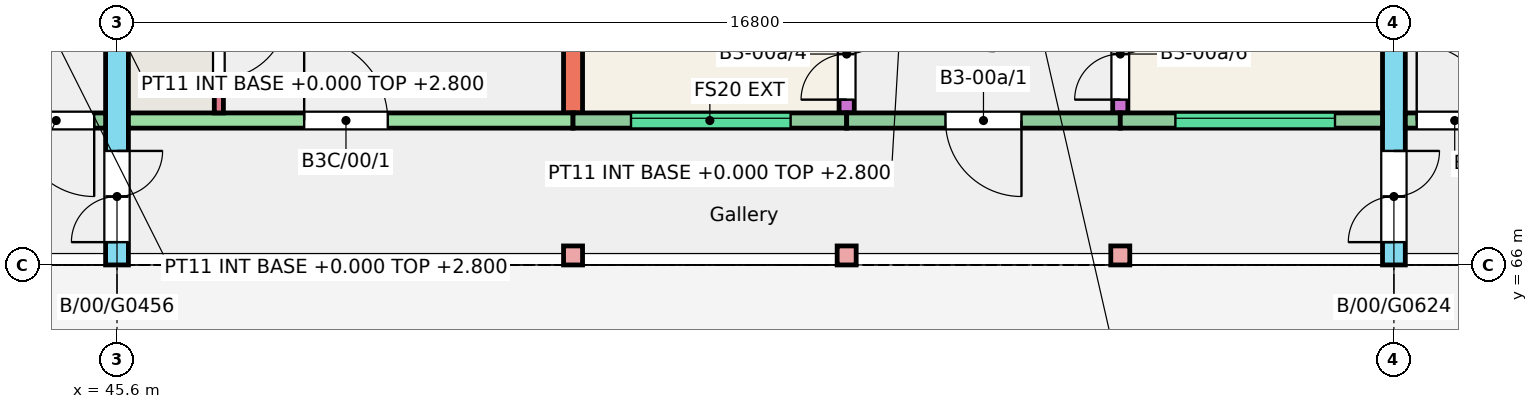
"""IFC4 building model, lengths in metres.
Left out: names, types, materials, properties, quantities, classifications, styles, units other than length and angle.
Written with IfcOpenShell. Run it as: python <this file> out.ifc"""

import sys

from ifc_helpers import new_model, si_unit, direction, frame, frame_2d, origin, origin_2d, place, context, subcontext, project, spatial, rectangle, extrude, element, fill, save


model = new_model("IFC4")
c1 = context("Model", 3, precision=1e-05, world=origin(), true_north=direction((0.0, 1.0)))
c2 = subcontext(c1, "Body", "Model", "MODEL_VIEW")
j1 = project(units=[si_unit("LENGTHUNIT", "METRE"), si_unit("PLANEANGLEUNIT", "RADIAN")], contexts=[c1])
p1 = place(None, origin())
s1 = spatial("IfcSite", under=j1, at=p1, CompositionType="ELEMENT")
p2 = place(p1, origin())
s2 = spatial("IfcBuilding", under=s1, at=p2, CompositionType="ELEMENT")
p3 = place(p2, origin())
s3 = spatial("IfcBuildingStorey", under=s2, at=p3, CompositionType="ELEMENT", Elevation=0.0)
p4 = place(p3, frame((45.6, 66.0, -0.25), z_axis=(0.0, 0.0, 1.0), x_axis=(0.0, 1.0, 0.0)))
e1 = element("IfcWall", 1, at=p4, inside=s3, PredefinedType="SHEAR", context=c2, shape_type="SweptSolid", body=[
    extrude(rectangle(XDim=11.0, YDim=0.3, at=frame_2d((5.5, 0.0))), origin(), (0.0, 0.0, 1.0), 3.25),
])
p5 = place(p4, frame((0.3, 0.0, 0.25)))
e2 = element("IfcOpeningElement", 2, at=p5, cuts=e1, PredefinedType="OPENING", context=c2, shape_type="SweptSolid", body=[
    extrude(rectangle(XDim=1.2, YDim=2.1, at=frame_2d((0.6, 1.05))), frame((0.0, 0.16, 0.0), z_axis=(0.0, -1.0, 0.0), x_axis=(1.0, 0.0, 0.0)), (0.0, 0.0, 1.0), 0.32),
])
p6 = place(p3, frame((51.6, 68.0, -0.25), z_axis=(0.0, 0.0, 1.0), x_axis=(0.0, 1.0, 0.0)))
e3 = element("IfcWall", 3, at=p6, inside=s3, PredefinedType="SHEAR", context=c2, shape_type="SweptSolid", body=[
    extrude(rectangle(XDim=9.0, YDim=0.25, at=frame_2d((4.5, 0.0))), origin(), (0.0, 0.0, 1.0), 3.25),
])
p7 = place(p3, frame((55.2, 68.0, -0.25), z_axis=(0.0, 0.0, 1.0), x_axis=(0.0, 1.0, 0.0)))
e4 = element("IfcWall", 4, at=p7, inside=s3, PredefinedType="SHEAR", context=c2, shape_type="SweptSolid", body=[
    extrude(rectangle(XDim=9.0, YDim=0.2, at=frame_2d((4.5, 0.0))), origin(), (0.0, 0.0, 1.0), 3.25),
])
p8 = place(p7, frame((0.175, 0.0, 0.25)))
e5 = element("IfcOpeningElement", 5, at=p8, cuts=e4, PredefinedType="OPENING", context=c2, shape_type="SweptSolid", body=[
    extrude(rectangle(XDim=1.2, YDim=2.1, at=frame_2d((0.6, 1.05))), frame((0.0, 0.11, 0.0), z_axis=(0.0, -1.0, 0.0), x_axis=(1.0, 0.0, 0.0)), (0.0, 0.0, 1.0), 0.22),
])
p9 = place(p7, frame((6.4, 0.0, 0.25)))
e6 = element("IfcOpeningElement", 6, at=p9, cuts=e4, PredefinedType="OPENING", context=c2, shape_type="SweptSolid", body=[
    extrude(rectangle(XDim=1.2, YDim=2.1, at=frame_2d((0.6, 1.05))), frame((0.0, 0.11, 0.0), z_axis=(0.0, -1.0, 0.0), x_axis=(1.0, 0.0, 0.0)), (0.0, 0.0, 1.0), 0.22),
])
p10 = place(p3, frame((58.8, 68.0, -0.25), z_axis=(0.0, 0.0, 1.0), x_axis=(0.0, 1.0, 0.0)))
e7 = element("IfcWall", 7, at=p10, inside=s3, PredefinedType="SHEAR", context=c2, shape_type="SweptSolid", body=[
    extrude(rectangle(XDim=9.0, YDim=0.2, at=frame_2d((4.5, 0.0))), origin(), (0.0, 0.0, 1.0), 3.25),
])
p11 = place(p10, frame((0.175, 0.0, 0.25)))
e8 = element("IfcOpeningElement", 8, at=p11, cuts=e7, PredefinedType="OPENING", context=c2, shape_type="SweptSolid", body=[
    extrude(rectangle(XDim=1.2, YDim=2.1, at=frame_2d((0.6, 1.05))), frame((0.0, 0.11, 0.0), z_axis=(0.0, -1.0, 0.0), x_axis=(1.0, 0.0, 0.0)), (0.0, 0.0, 1.0), 0.22),
])
p12 = place(p10, frame((6.4, 0.0, 0.25)))
e9 = element("IfcOpeningElement", 9, at=p12, cuts=e7, PredefinedType="OPENING", context=c2, shape_type="SweptSolid", body=[
    extrude(rectangle(XDim=1.2, YDim=2.1, at=frame_2d((0.6, 1.05))), frame((0.0, 0.11, 0.0), z_axis=(0.0, -1.0, 0.0), x_axis=(1.0, 0.0, 0.0)), (0.0, 0.0, 1.0), 0.22),
])
p13 = place(p3, frame((62.4, 66.0, -0.25), z_axis=(0.0, 0.0, 1.0), x_axis=(0.0, 1.0, 0.0)))
e10 = element("IfcWall", 10, at=p13, inside=s3, PredefinedType="SHEAR", context=c2, shape_type="SweptSolid", body=[
    extrude(rectangle(XDim=11.0, YDim=0.3, at=frame_2d((5.5, 0.0))), origin(), (0.0, 0.0, 1.0), 3.25),
])
p14 = place(p13, frame((0.3, 0.0, 0.25)))
e11 = element("IfcOpeningElement", 11, at=p14, cuts=e10, PredefinedType="OPENING", context=c2, shape_type="SweptSolid", body=[
    extrude(rectangle(XDim=1.2, YDim=2.1, at=frame_2d((0.6, 1.05))), frame((0.0, 0.16, 0.0), z_axis=(0.0, -1.0, 0.0), x_axis=(1.0, 0.0, 0.0)), (0.0, 0.0, 1.0), 0.32),
])
p15 = place(p3, frame((42.0, 67.9, -0.25), z_axis=(0.0, 0.0, 1.0), x_axis=(1.0, 0.0, 0.0)))
e12 = element("IfcWall", 12, at=p15, inside=s3, PredefinedType="SOLIDWALL", context=c2, shape_type="SweptSolid", body=[
    extrude(rectangle(XDim=3.45, YDim=0.2, at=frame_2d((1.725, 0.0))), origin(), (0.0, 0.0, 1.0), 3.25),
])
p16 = place(p15, frame((0.482, 0.0, 1.35)))
e13 = element("IfcOpeningElement", 13, at=p16, cuts=e12, PredefinedType="OPENING", context=c2, shape_type="SweptSolid", body=[
    extrude(rectangle(XDim=1.2, YDim=1.3, at=frame_2d((0.6, 0.65))), frame((0.0, 0.11, 0.0), z_axis=(0.0, -1.0, 0.0), x_axis=(1.0, 0.0, 0.0)), (0.0, 0.0, 1.0), 0.22),
])
p17 = place(p15, frame((2.3, 0.0, 0.25)))
e14 = element("IfcOpeningElement", 14, at=p17, cuts=e12, PredefinedType="OPENING", context=c2, shape_type="SweptSolid", body=[
    extrude(rectangle(XDim=1.0, YDim=2.1, at=frame_2d((0.5, 1.05))), frame((0.0, 0.11, 0.0), z_axis=(0.0, -1.0, 0.0), x_axis=(1.0, 0.0, 0.0)), (0.0, 0.0, 1.0), 0.22),
])
p18 = place(p3, frame((45.75, 67.9, -0.25), z_axis=(0.0, 0.0, 1.0), x_axis=(1.0, 0.0, 0.0)))
e15 = element("IfcWall", 15, at=p18, inside=s3, PredefinedType="SHEAR", context=c2, shape_type="SweptSolid", body=[
    extrude(rectangle(XDim=5.85, YDim=0.2, at=frame_2d((2.925, 0.0))), origin(), (0.0, 0.0, 1.0), 3.25),
])
p19 = place(p18, frame((2.312, 0.0, 0.25)))
e16 = element("IfcOpeningElement", 16, at=p19, cuts=e15, PredefinedType="OPENING", context=c2, shape_type="SweptSolid", body=[
    extrude(rectangle(XDim=1.1, YDim=2.1, at=frame_2d((0.55, 1.05))), frame((0.0, 0.11, 0.0), z_axis=(0.0, -1.0, 0.0), x_axis=(1.0, 0.0, 0.0)), (0.0, 0.0, 1.0), 0.22),
])
p20 = place(p3, frame((46.94, 68.0, -0.25), z_axis=(0.0, 0.0, 1.0), x_axis=(0.0, 1.0, 0.0)))
e17 = element("IfcWall", 17, at=p20, inside=s3, PredefinedType="SHEAR", context=c2, shape_type="SweptSolid", body=[
    extrude(rectangle(XDim=1.72, YDim=0.12, at=frame_2d((0.86, 0.0))), origin(), (0.0, 0.0, 1.0), 3.25),
])
p21 = place(p20, frame((0.45, 0.0, 0.25)))
e18 = element("IfcOpeningElement", 18, at=p21, cuts=e17, PredefinedType="OPENING", context=c2, shape_type="SweptSolid", body=[
    extrude(rectangle(XDim=0.9, YDim=2.1, at=frame_2d((0.45, 1.05))), frame((0.0, 0.07, 0.0), z_axis=(0.0, -1.0, 0.0), x_axis=(1.0, 0.0, 0.0)), (0.0, 0.0, 1.0), 0.14),
])
p22 = place(p3, frame((51.6, 67.9, -0.25), z_axis=(0.0, 0.0, 1.0), x_axis=(1.0, 0.0, 0.0)))
e19 = element("IfcWall", 19, at=p22, inside=s3, PredefinedType="SOLIDWALL", context=c2, shape_type="SweptSolid", body=[
    extrude(rectangle(XDim=3.6, YDim=0.2, at=frame_2d((1.8, 0.0))), origin(), (0.0, 0.0, 1.0), 3.25),
])
p23 = place(p22, frame((0.762, 0.0, 1.45)))
e20 = element("IfcOpeningElement", 20, at=p23, cuts=e19, PredefinedType="OPENING", context=c2, shape_type="SweptSolid", body=[
    extrude(rectangle(XDim=2.1, YDim=1.2, at=frame_2d((1.05, 0.6))), frame((0.0, 0.11, 0.0), z_axis=(0.0, -1.0, 0.0), x_axis=(1.0, 0.0, 0.0)), (0.0, 0.0, 1.0), 0.22),
])
p24 = place(p3, frame((55.2, 67.9, -0.25), z_axis=(0.0, 0.0, 1.0), x_axis=(1.0, 0.0, 0.0)))
e21 = element("IfcWall", 21, at=p24, inside=s3, PredefinedType="SOLIDWALL", context=c2, shape_type="SweptSolid", body=[
    extrude(rectangle(XDim=3.6, YDim=0.2, at=frame_2d((1.8, 0.0))), origin(), (0.0, 0.0, 1.0), 3.25),
])
p25 = place(p24, frame((1.3, 0.0, 0.25)))
e22 = element("IfcOpeningElement", 22, at=p25, cuts=e21, PredefinedType="OPENING", context=c2, shape_type="SweptSolid", body=[
    extrude(rectangle(XDim=1.0, YDim=2.1, at=frame_2d((0.5, 1.05))), frame((0.0, 0.11, 0.0), z_axis=(0.0, -1.0, 0.0), x_axis=(1.0, 0.0, 0.0)), (0.0, 0.0, 1.0), 0.22),
])
p26 = place(p3, frame((58.8, 67.9, -0.25), z_axis=(0.0, 0.0, 1.0), x_axis=(1.0, 0.0, 0.0)))
e23 = element("IfcWall", 23, at=p26, inside=s3, PredefinedType="SOLIDWALL", context=c2, shape_type="SweptSolid", body=[
    extrude(rectangle(XDim=3.45, YDim=0.2, at=frame_2d((1.725, 0.0))), origin(), (0.0, 0.0, 1.0), 3.25),
])
p27 = place(p26, frame((0.725, 0.0, 1.45)))
e24 = element("IfcOpeningElement", 24, at=p27, cuts=e23, PredefinedType="OPENING", context=c2, shape_type="SweptSolid", body=[
    extrude(rectangle(XDim=2.1, YDim=1.2, at=frame_2d((1.05, 0.6))), frame((0.0, 0.11, 0.0), z_axis=(0.0, -1.0, 0.0), x_axis=(1.0, 0.0, 0.0)), (0.0, 0.0, 1.0), 0.22),
])
p28 = place(p3, frame((62.55, 67.9, -0.25), z_axis=(0.0, 0.0, 1.0), x_axis=(1.0, 0.0, 0.0)))
e25 = element("IfcWall", 25, at=p28, inside=s3, PredefinedType="SOLIDWALL", context=c2, shape_type="SweptSolid", body=[
    extrude(rectangle(XDim=3.45, YDim=0.2, at=frame_2d((1.725, 0.0))), origin(), (0.0, 0.0, 1.0), 3.25),
])
p29 = place(p28, frame((1.768, 0.0, 1.35)))
e26 = element("IfcOpeningElement", 26, at=p29, cuts=e25, PredefinedType="OPENING", context=c2, shape_type="SweptSolid", body=[
    extrude(rectangle(XDim=1.2, YDim=1.3, at=frame_2d((0.6, 0.65))), frame((0.0, 0.11, 0.0), z_axis=(0.0, -1.0, 0.0), x_axis=(1.0, 0.0, 0.0)), (0.0, 0.0, 1.0), 0.22),
])
p30 = place(p28, frame((0.15, 0.0, 0.25)))
e27 = element("IfcOpeningElement", 27, at=p30, cuts=e25, PredefinedType="OPENING", context=c2, shape_type="SweptSolid", body=[
    extrude(rectangle(XDim=1.0, YDim=2.1, at=frame_2d((0.5, 1.05))), frame((0.0, 0.11, 0.0), z_axis=(0.0, -1.0, 0.0), x_axis=(1.0, 0.0, 0.0)), (0.0, 0.0, 1.0), 0.22),
])
for number, where, z_axis, x_axis in (
    (28, (51.6, 66.125, -0.25), (0.0, 0.0, 1.0), (1.0, 0.0, 0.0)),
    (29, (55.2, 66.125, -0.25), (0.0, 0.0, 1.0), (1.0, 0.0, 0.0)),
    (30, (58.8, 66.125, -0.25), (0.0, 0.0, 1.0), (1.0, 0.0, 0.0)),
):
    element("IfcColumn", number, at=place(p3, frame(where, z_axis=z_axis, x_axis=x_axis)), inside=s3, PredefinedType="COLUMN", context=c2, shape_type="SweptSolid", body=[
        extrude(rectangle(XDim=0.25, YDim=0.25, at=origin_2d()), origin(), (0.0, 0.0, 1.0), 3.25),
    ])
p31 = place(p23, origin())
e31 = element("IfcWindow", 31, at=p31, inside=s3, PartitioningType="SINGLE_PANEL", PredefinedType="WINDOW", context=c2, shape_type="SweptSolid", body=[
    extrude(rectangle(XDim=2.1, YDim=1.2, at=frame_2d((1.05, 0.6))), frame((0.0, 0.06, 0.0), z_axis=(0.0, -1.0, 0.0), x_axis=(1.0, 0.0, 0.0)), (0.0, 0.0, 1.0), 0.06),
])
fill(e20, e31)
p32 = place(p27, origin())
e32 = element("IfcWindow", 32, at=p32, inside=s3, PartitioningType="SINGLE_PANEL", PredefinedType="WINDOW", context=c2, shape_type="SweptSolid", body=[
    extrude(rectangle(XDim=2.1, YDim=1.2, at=frame_2d((1.05, 0.6))), frame((0.0, 0.06, 0.0), z_axis=(0.0, -1.0, 0.0), x_axis=(1.0, 0.0, 0.0)), (0.0, 0.0, 1.0), 0.06),
])
fill(e24, e32)
p33 = place(p17, origin())
e33 = element("IfcDoor", 33, at=p33, inside=s3, OperationType="SINGLE_SWING_RIGHT", PredefinedType="DOOR", context=c2, shape_type="SweptSolid", body=[
    extrude(rectangle(XDim=1.0, YDim=2.1, at=frame_2d((0.5, 1.05))), frame((0.0, 0.025, 0.0), z_axis=(0.0, -1.0, 0.0), x_axis=(1.0, 0.0, 0.0)), (0.0, 0.0, 1.0), 0.05),
])
fill(e14, e33)
p34 = place(p25, origin())
e34 = element("IfcDoor", 34, at=p34, inside=s3, OperationType="SINGLE_SWING_RIGHT", PredefinedType="DOOR", context=c2, shape_type="SweptSolid", body=[
    extrude(rectangle(XDim=1.0, YDim=2.1, at=frame_2d((0.5, 1.05))), frame((0.0, 0.025, 0.0), z_axis=(0.0, -1.0, 0.0), x_axis=(1.0, 0.0, 0.0)), (0.0, 0.0, 1.0), 0.05),
])
fill(e22, e34)
p35 = place(p8, origin())
e35 = element("IfcDoor", 35, at=p35, inside=s3, OperationType="DOUBLE_DOOR_SINGLE_SWING", PredefinedType="DOOR", context=c2, shape_type="SweptSolid", body=[
    extrude(rectangle(XDim=1.2, YDim=2.1, at=frame_2d((0.6, 1.05))), frame((0.0, 0.025, 0.0), z_axis=(0.0, -1.0, 0.0), x_axis=(1.0, 0.0, 0.0)), (0.0, 0.0, 1.0), 0.05),
])
fill(e5, e35)
p36 = place(p11, origin())
e36 = element("IfcDoor", 36, at=p36, inside=s3, OperationType="DOUBLE_DOOR_SINGLE_SWING", PredefinedType="DOOR", context=c2, shape_type="SweptSolid", body=[
    extrude(rectangle(XDim=1.2, YDim=2.1, at=frame_2d((0.6, 1.05))), frame((0.0, 0.025, 0.0), z_axis=(0.0, -1.0, 0.0), x_axis=(1.0, 0.0, 0.0)), (0.0, 0.0, 1.0), 0.05),
])
fill(e8, e36)
p37 = place(p30, origin())
e37 = element("IfcDoor", 37, at=p37, inside=s3, OperationType="SINGLE_SWING_LEFT", PredefinedType="DOOR", context=c2, shape_type="SweptSolid", body=[
    extrude(rectangle(XDim=1.0, YDim=2.1, at=frame_2d((0.5, 1.05))), frame((0.0, 0.025, 0.0), z_axis=(0.0, -1.0, 0.0), x_axis=(1.0, 0.0, 0.0)), (0.0, 0.0, 1.0), 0.05),
])
fill(e27, e37)
p38 = place(p19, origin())
e38 = element("IfcDoor", 38, at=p38, inside=s3, OperationType="SINGLE_SWING_LEFT", PredefinedType="DOOR", context=c2, shape_type="SweptSolid", body=[
    extrude(rectangle(XDim=1.1, YDim=2.1, at=frame_2d((0.55, 1.05))), frame((0.0, 0.025, 0.0), z_axis=(0.0, -1.0, 0.0), x_axis=(1.0, 0.0, 0.0)), (0.0, 0.0, 1.0), 0.05),
])
fill(e16, e38)
p39 = place(p21, origin())
e39 = element("IfcDoor", 39, at=p39, inside=s3, OperationType="SINGLE_SWING_RIGHT", PredefinedType="DOOR", context=c2, shape_type="SweptSolid", body=[
    extrude(rectangle(XDim=0.9, YDim=2.1, at=frame_2d((0.45, 1.05))), frame((0.0, 0.025, 0.0), z_axis=(0.0, -1.0, 0.0), x_axis=(1.0, 0.0, 0.0)), (0.0, 0.0, 1.0), 0.05),
])
fill(e18, e39)
p40 = place(p5, origin())
e40 = element("IfcDoor", 40, at=p40, inside=s3, OperationType="DOUBLE_DOOR_SINGLE_SWING", PredefinedType="DOOR", context=c2, shape_type="SweptSolid", body=[
    extrude(rectangle(XDim=1.2, YDim=2.1, at=frame_2d((0.6, 1.05))), frame((0.0, 0.025, 0.0), z_axis=(0.0, -1.0, 0.0), x_axis=(1.0, 0.0, 0.0)), (0.0, 0.0, 1.0), 0.05),
])
fill(e2, e40)
p41 = place(p14, origin())
e41 = element("IfcDoor", 41, at=p41, inside=s3, OperationType="DOUBLE_DOOR_SINGLE_SWING", PredefinedType="DOOR", context=c2, shape_type="SweptSolid", body=[
    extrude(rectangle(XDim=1.2, YDim=2.1, at=frame_2d((0.6, 1.05))), frame((0.0, 0.025, 0.0), z_axis=(0.0, -1.0, 0.0), x_axis=(1.0, 0.0, 0.0)), (0.0, 0.0, 1.0), 0.05),
])
fill(e11, e41)
save(model, sys.argv[1])
